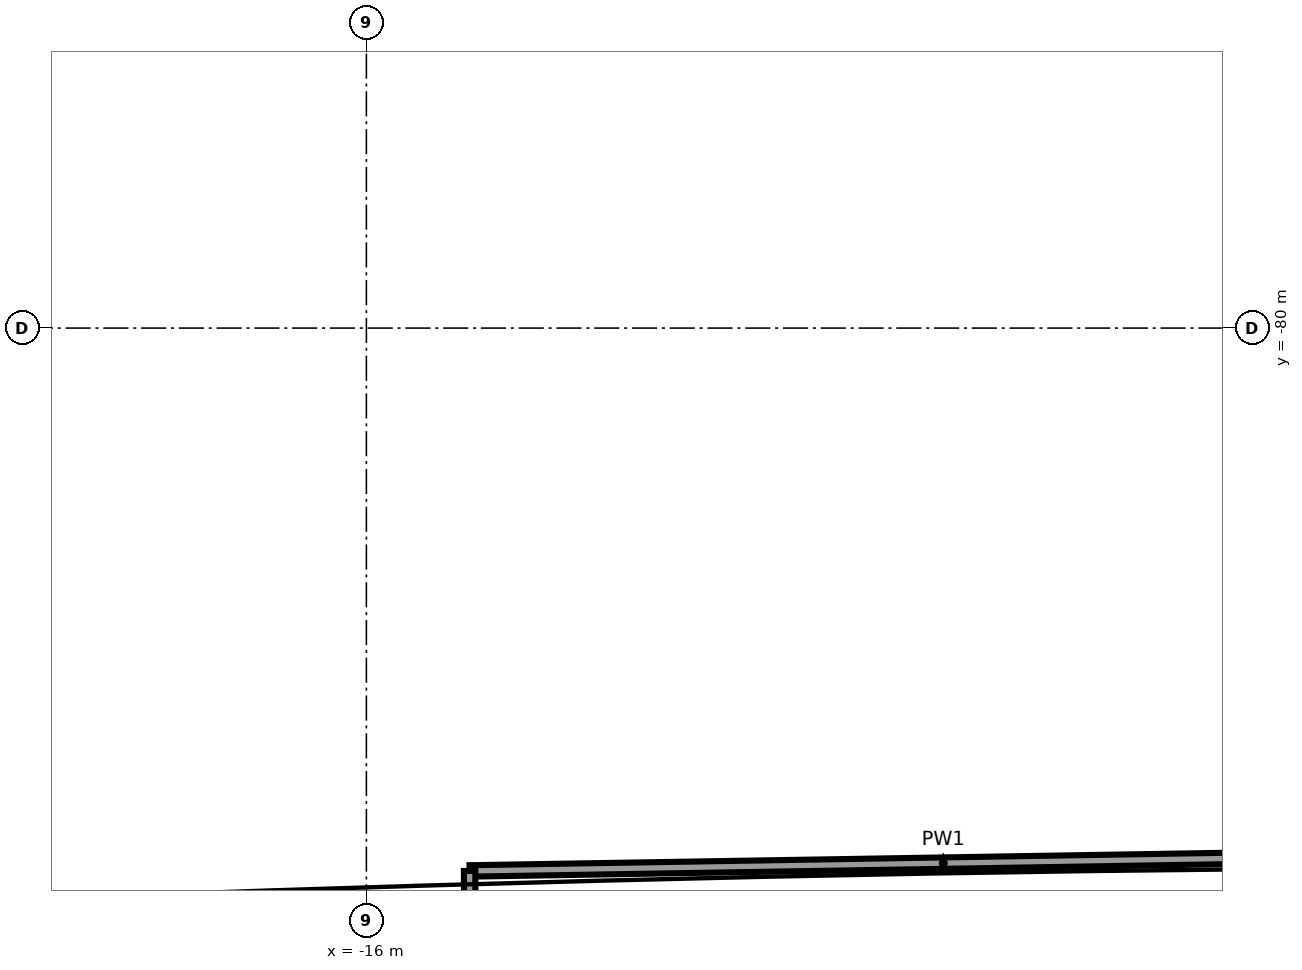
"""IFC4 building model, lengths in metres.
Left out: names, types, materials, properties, quantities, classifications, styles, units other than length and angle.
Written with IfcOpenShell. Run it as: python <this file> out.ifc"""

import sys

from ifc_helpers import new_model, si_unit, direction, frame, frame_2d, origin, place, context, subcontext, project, spatial, rectangle, extrude, element, save


model = new_model("IFC4")
c1 = context("Model", 3, precision=1e-05, world=origin(), true_north=direction((0.0, 1.0)))
c2 = subcontext(c1, "Body", "Model", "MODEL_VIEW")
j1 = project(units=[si_unit("LENGTHUNIT", "METRE"), si_unit("PLANEANGLEUNIT", "RADIAN")], contexts=[c1])
p1 = place(None, origin())
s1 = spatial("IfcSite", under=j1, at=p1, CompositionType="ELEMENT")
p2 = place(p1, origin())
s2 = spatial("IfcBuilding", under=s1, at=p2, CompositionType="ELEMENT")
p3 = place(p2, frame((0.0, 0.0, 24.0)))
s3 = spatial("IfcBuildingStorey", under=s2, at=p3, CompositionType="ELEMENT", Elevation=24.0)
p4 = place(p3, frame((-2.178, -86.937, 0.0), z_axis=(0.0, 0.0, 1.0), x_axis=(-0.999864668818, -0.016451262841, 0.0)))
e1 = element("IfcWall", 1, at=p4, inside=s3, PredefinedType="PARTITIONING", context=c2, shape_type="SweptSolid", body=[
    extrude(rectangle(XDim=12.466, YDim=0.15, at=frame_2d((6.233, 0.0))), origin(), (0.0, 0.0, 1.0), 5.4),
])
p5 = place(p3, frame((-14.642, -87.142, 0.0), z_axis=(0.0, 0.0, 1.0), x_axis=(0.005602780728, -0.999984304301, 0.0)))
e2 = element("IfcWall", 2, at=p5, inside=s3, PredefinedType="PARTITIONING", context=c2, shape_type="SweptSolid", body=[
    extrude(rectangle(XDim=5.447, YDim=0.15, at=frame_2d((2.723, 0.0))), origin(), (0.0, 0.0, 1.0), 5.4),
])
p6 = place(p5, frame((1.55, 0.0, 0.0)))
e3 = element("IfcOpeningElement", 3, at=p6, cuts=e2, PredefinedType="OPENING", context=c2, shape_type="SweptSolid", body=[
    extrude(rectangle(XDim=1.8, YDim=2.1, at=frame_2d((0.9, 1.05))), frame((0.0, 0.085, 0.0), z_axis=(0.0, -1.0, 0.0), x_axis=(1.0, 0.0, 0.0)), (0.0, 0.0, 1.0), 0.17),
])
save(model, sys.argv[1])
